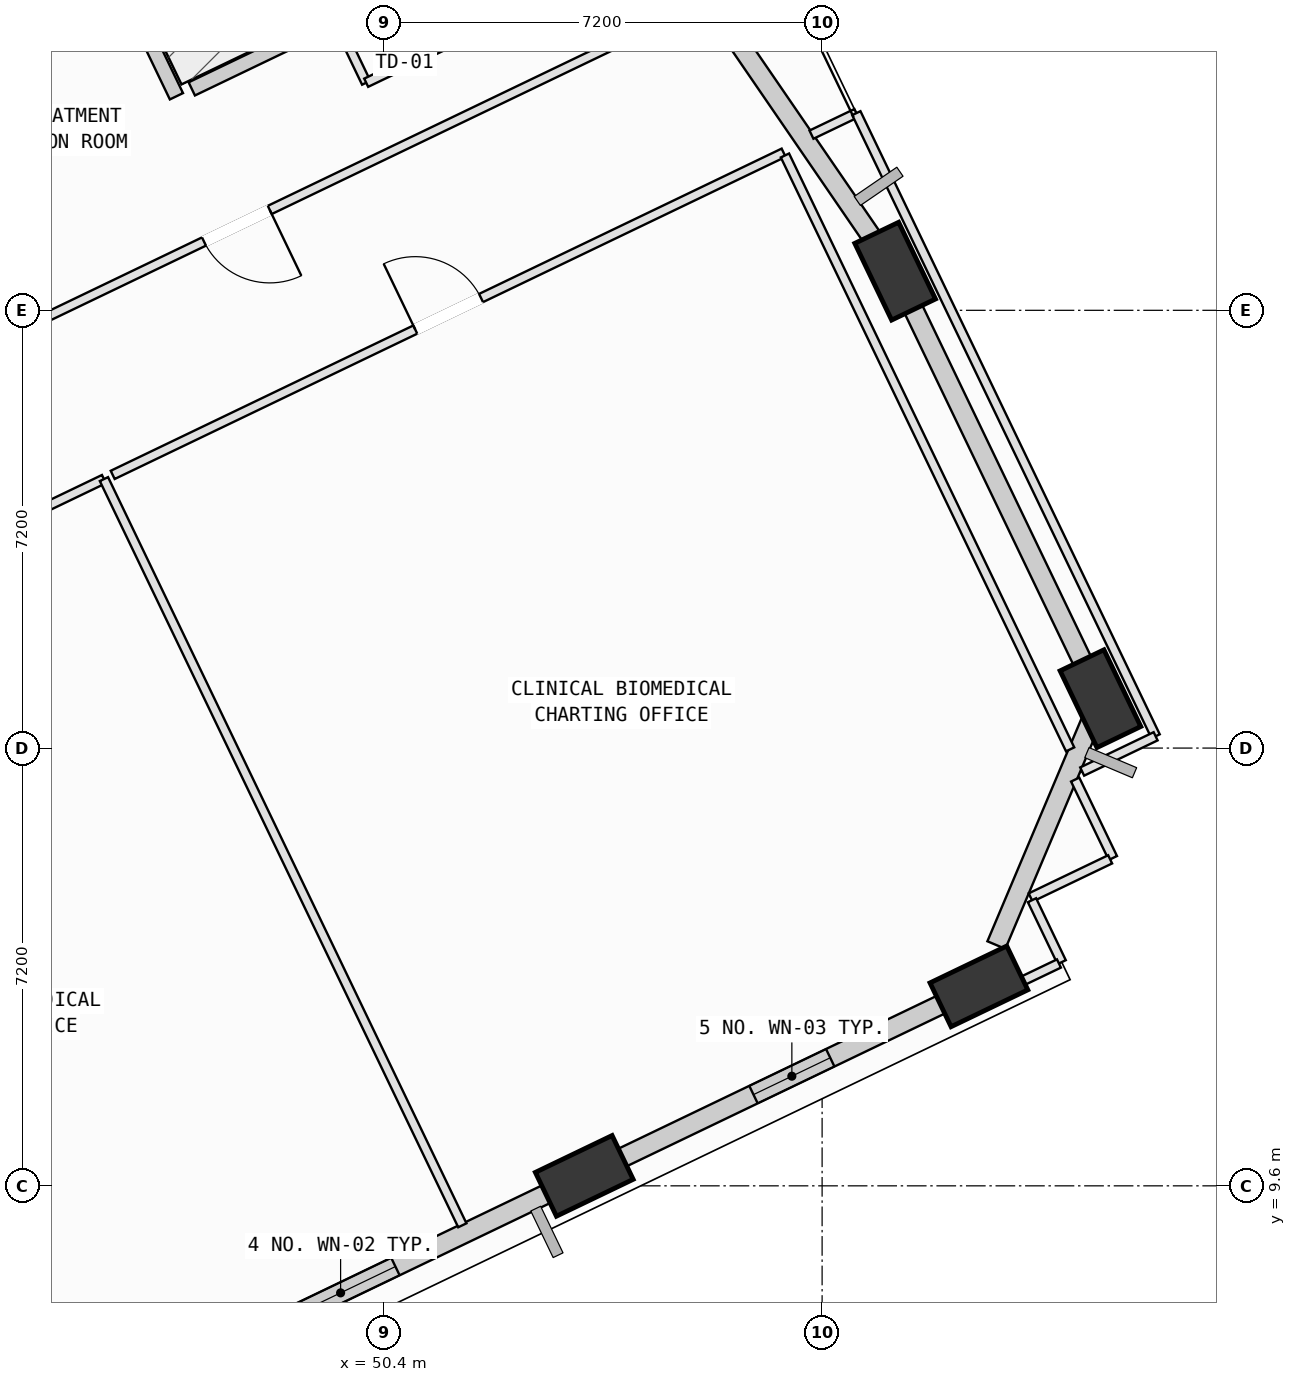
"""IFC4 building model, lengths in metres.
Left out: names, types, materials, properties, quantities, classifications, styles, units other than length and angle.
Written with IfcOpenShell. Run it as: python <this file> out.ifc"""

import sys

from ifc_helpers import new_model, si_unit, direction, frame, frame_2d, origin, origin_2d, place, context, subcontext, project, spatial, rectangle, extrude, element, fill, save


model = new_model("IFC4")
c1 = context("Model", 3, precision=1e-05, world=origin(), true_north=direction((0.0, 1.0)))
c2 = subcontext(c1, "Body", "Model", "MODEL_VIEW")
j1 = project(units=[si_unit("LENGTHUNIT", "METRE"), si_unit("PLANEANGLEUNIT", "RADIAN")], contexts=[c1])
p1 = place(None, origin())
s1 = spatial("IfcSite", under=j1, at=p1, CompositionType="ELEMENT")
p2 = place(p1, origin())
s2 = spatial("IfcBuilding", under=s1, at=p2, CompositionType="ELEMENT")
p3 = place(p2, frame((0.0, 0.0, 132.4)))
s3 = spatial("IfcBuildingStorey", under=s2, at=p3, CompositionType="ELEMENT", Elevation=132.4)
p4 = place(p3, frame((53.688, 9.764, 0.002), z_axis=(0.06131027357, 0.083306625435, 0.994636142775), x_axis=(-0.981231513844, 0.18756322246, 0.044774477334)))
e1 = element("IfcColumn", 1, at=p4, inside=s3, PredefinedType="COLUMN", context=c2, shape_type="SweptSolid", body=[
    extrude(rectangle(XDim=1.4, YDim=0.8, at=origin_2d()), origin(), (0.0, 0.0, 1.0), 4.018),
])
p5 = place(p3, frame((60.179, 12.881, 0.002), z_axis=(0.048096029974, 0.109777823773, 0.992791821737), x_axis=(-0.998144320493, -0.03187998618, 0.051880458253)))
e2 = element("IfcColumn", 2, at=p5, inside=s3, PredefinedType="COLUMN", context=c2, shape_type="SweptSolid", body=[
    extrude(rectangle(XDim=1.4, YDim=0.8, at=origin_2d()), origin(), (0.0, 0.0, 1.0), 4.025),
])
p6 = place(p3, frame((62.178, 17.612, 0.002), z_axis=(0.028561654516, 0.117824404935, 0.99262361522), x_axis=(0.209885345046, -0.971598652903, 0.109289521967)))
e3 = element("IfcColumn", 3, at=p6, inside=s3, PredefinedType="COLUMN", context=c2, shape_type="SweptSolid", body=[
    extrude(rectangle(XDim=1.4, YDim=0.8, at=origin_2d()), origin(), (0.0, 0.0, 1.0), 4.026),
])
p7 = place(p3, frame((58.801, 24.644, 0.002), z_axis=(-0.00024304177, 0.103900356523, 0.994587681829), x_axis=(0.434968645662, -0.89556113761, 0.093661764304)))
e4 = element("IfcColumn", 4, at=p7, inside=s3, PredefinedType="COLUMN", context=c2, shape_type="SweptSolid", body=[
    extrude(rectangle(XDim=1.4, YDim=0.8, at=origin_2d()), origin(), (0.0, 0.0, 1.0), 4.018),
])
p8 = place(p3, frame((47.233, 27.642, 0.0), z_axis=(0.0, 0.0, 1.0), x_axis=(0.901461742276, 0.432858784376, 0.0)))
e5 = element("IfcWall", 5, at=p8, inside=s3, PredefinedType="SOLIDWALL", context=c2, shape_type="SweptSolid", body=[
    extrude(rectangle(XDim=6.96, YDim=0.24, at=frame_2d((3.48, 0.0))), origin(), (0.0, 0.0, 1.0), 2.945),
])
p9 = place(p8, frame((2.93, 0.0, 0.0)))
e6 = element("IfcOpeningElement", 6, at=p9, cuts=e5, PredefinedType="OPENING", context=c2, shape_type="SweptSolid", body=[
    extrude(rectangle(XDim=1.1, YDim=2.15, at=frame_2d((0.55, 1.075))), frame((0.0, 0.13, 0.0), z_axis=(0.0, -1.0, 0.0), x_axis=(1.0, 0.0, 0.0)), (0.0, 0.0, 1.0), 0.26),
])
p10 = place(p3, frame((45.899, 29.774, 0.0), z_axis=(0.0, 0.0, 1.0), x_axis=(0.432937429984, -0.901423974453, 0.0)))
e7 = element("IfcWall", 7, at=p10, inside=s3, PredefinedType="SOLIDWALL", context=c2, shape_type="SweptSolid", body=[
    extrude(rectangle(XDim=2.5, YDim=0.24, at=frame_2d((1.25, 0.0))), origin(), (0.0, 0.0, 1.0), 3.165),
])
p11 = place(p3, frame((53.415, 9.633, 0.0), z_axis=(0.0, 0.0, 1.0), x_axis=(-0.901458716823, -0.43286508506, 0.0)))
e8 = element("IfcWall", 8, at=p11, inside=s3, PredefinedType="SOLIDWALL", context=c2, shape_type="SweptSolid", body=[
    extrude(rectangle(XDim=6.218, YDim=0.32, at=frame_2d((3.109, 0.0))), origin(), (0.0, 0.0, 1.0), 3.165),
])
p12 = place(p11, frame((3.142, 0.0, 0.75)))
e9 = element("IfcOpeningElement", 9, at=p12, cuts=e8, PredefinedType="OPENING", context=c2, shape_type="SweptSolid", body=[
    extrude(rectangle(XDim=2.0, YDim=1.95, at=frame_2d((1.0, 0.975))), frame((0.0, 0.17, 0.0), z_axis=(0.0, -1.0, 0.0), x_axis=(1.0, 0.0, 0.0)), (0.0, 0.0, 1.0), 0.34),
])
p13 = place(p3, frame((59.92, 12.756, 0.0), z_axis=(0.0, 0.0, 1.0), x_axis=(-0.901454692094, -0.432873466619, 0.0)))
e10 = element("IfcWall", 10, at=p13, inside=s3, PredefinedType="SOLIDWALL", context=c2, shape_type="SweptSolid", body=[
    extrude(rectangle(XDim=6.242, YDim=0.32, at=frame_2d((3.121, 0.0))), origin(), (0.0, 0.0, 1.0), 3.165),
])
p14 = place(p13, frame((2.425, 0.0, 0.75)))
e11 = element("IfcOpeningElement", 11, at=p14, cuts=e10, PredefinedType="OPENING", context=c2, shape_type="SweptSolid", body=[
    extrude(rectangle(XDim=1.4, YDim=1.85, at=frame_2d((0.7, 0.925))), frame((0.0, 0.17, 0.0), z_axis=(0.0, -1.0, 0.0), x_axis=(1.0, 0.0, 0.0)), (0.0, 0.0, 1.0), 0.34),
])
p15 = place(p3, frame((62.079, 17.379, 0.0), z_axis=(0.0, 0.0, 1.0), x_axis=(-0.38914420919, -0.921176847545, 0.0)))
e12 = element("IfcWall", 12, at=p15, inside=s3, PredefinedType="SOLIDWALL", context=c2, shape_type="SweptSolid", body=[
    extrude(rectangle(XDim=4.145, YDim=0.32, at=frame_2d((2.073, 0.0))), origin(), (0.0, 0.0, 1.0), 3.165),
])
p16 = place(p3, frame((58.931, 24.374, 0.0), z_axis=(0.0, 0.0, 1.0), x_axis=(0.432850582389, -0.901465680614, 0.0)))
e13 = element("IfcWall", 13, at=p16, inside=s3, PredefinedType="SOLIDWALL", context=c2, shape_type="SweptSolid", body=[
    extrude(rectangle(XDim=6.84, YDim=0.32, at=frame_2d((3.42, 0.0))), origin(), (0.0, 0.0, 1.0), 3.165),
])
p17 = place(p3, frame((53.433, 32.472, 0.0), z_axis=(0.0, 0.0, 1.0), x_axis=(0.565541240042, -0.824720016619, 0.0)))
e14 = element("IfcWall", 14, at=p17, inside=s3, PredefinedType="SOLIDWALL", context=c2, shape_type="SweptSolid", body=[
    extrude(rectangle(XDim=8.838, YDim=0.32, at=frame_2d((4.419, 0.0))), origin(), (0.0, 0.0, 1.0), 3.165),
])
p18 = place(p3, frame((41.489, 27.091, 0.0), z_axis=(0.0, 0.0, 1.0), x_axis=(0.901450827028, 0.432881515488, 0.0)))
e15 = element("IfcWall", 15, at=p18, inside=s3, PredefinedType="SOLIDWALL", context=c2, shape_type="SweptSolid", body=[
    extrude(rectangle(XDim=5.117, YDim=0.32, at=frame_2d((2.559, 0.0))), origin(), (0.0, 0.0, 1.0), 3.145),
])
p19 = place(p18, frame((1.635, 0.0, 0.75)))
e16 = element("IfcOpeningElement", 16, at=p19, cuts=e15, PredefinedType="OPENING", context=c2, shape_type="SweptSolid", body=[
    extrude(rectangle(XDim=2.0, YDim=1.95, at=frame_2d((1.0, 0.975))), frame((0.0, 0.17, 0.0), z_axis=(0.0, -1.0, 0.0), x_axis=(1.0, 0.0, 0.0)), (0.0, 0.0, 1.0), 0.34),
])
p20 = place(p3, frame((36.5, 16.763, 0.0), z_axis=(0.0, 0.0, 1.0), x_axis=(0.901430980475, 0.432922842363, 0.0)))
e17 = element("IfcWall", 17, at=p20, inside=s3, PredefinedType="PARTITIONING", context=c2, shape_type="SweptSolid", body=[
    extrude(rectangle(XDim=10.305, YDim=0.15, at=frame_2d((5.152, 0.0))), origin(), (0.0, 0.0, 1.0), 2.965),
])
p21 = place(p20, frame((4.552, 0.0, 0.0)))
e18 = element("IfcOpeningElement", 18, at=p21, cuts=e17, PredefinedType="OPENING", context=c2, shape_type="SweptSolid", body=[
    extrude(rectangle(XDim=1.2, YDim=2.15, at=frame_2d((0.6, 1.075))), frame((0.0, 0.085, 0.0), z_axis=(0.0, -1.0, 0.0), x_axis=(1.0, 0.0, 0.0)), (0.0, 0.0, 1.0), 0.17),
])
p22 = place(p3, frame((45.789, 21.224, 0.0), z_axis=(0.0, 0.0, 1.0), x_axis=(0.43290477925, -0.901439655275, 0.0)))
e19 = element("IfcWall", 19, at=p22, inside=s3, PredefinedType="PARTITIONING", context=c2, shape_type="SweptSolid", body=[
    extrude(rectangle(XDim=13.615, YDim=0.15, at=frame_2d((6.808, 0.0))), origin(), (0.0, 0.0, 1.0), 3.78),
])
p23 = place(p3, frame((45.933, 21.293, 0.0), z_axis=(0.0, 0.0, 1.0), x_axis=(0.901434334473, 0.432915858607, 0.0)))
e20 = element("IfcWall", 20, at=p23, inside=s3, PredefinedType="PARTITIONING", context=c2, shape_type="SweptSolid", body=[
    extrude(rectangle(XDim=12.24, YDim=0.15, at=frame_2d((6.12, 0.0))), origin(), (0.0, 0.0, 1.0), 3.78),
])
p24 = place(p23, frame((5.52, 0.0, 0.0)))
e21 = element("IfcOpeningElement", 21, at=p24, cuts=e20, PredefinedType="OPENING", context=c2, shape_type="SweptSolid", body=[
    extrude(rectangle(XDim=1.2, YDim=2.15, at=frame_2d((0.6, 1.075))), frame((0.0, 0.085, 0.0), z_axis=(0.0, -1.0, 0.0), x_axis=(1.0, 0.0, 0.0)), (0.0, 0.0, 1.0), 0.17),
])
p25 = place(p3, frame((56.989, 26.547, 0.0), z_axis=(0.0, 0.0, 1.0), x_axis=(0.432826288484, -0.901477345249, 0.0)))
e22 = element("IfcWall", 22, at=p25, inside=s3, PredefinedType="PARTITIONING", context=c2, shape_type="SweptSolid", body=[
    extrude(rectangle(XDim=10.836, YDim=0.15, at=frame_2d((5.418, 0.0))), origin(), (0.0, 0.0, 1.0), 3.78),
])
p26 = place(p3, frame((61.762, 16.282, 0.0), z_axis=(0.0, 0.0, 1.0), x_axis=(0.433241147815, -0.901278041361, 0.0)))
e23 = element("IfcWall", 23, at=p26, inside=s3, PredefinedType="PARTITIONING", context=c2, shape_type="SweptSolid", body=[
    extrude(rectangle(XDim=1.431, YDim=0.15, at=frame_2d((0.716, 0.0))), origin(), (0.0, 0.0, 1.0), 3.78),
])
p27 = place(p3, frame((62.337, 14.97, 0.0), z_axis=(0.0, 0.0, 1.0), x_axis=(-0.901617655836, -0.432533932409, 0.0)))
e24 = element("IfcWall", 24, at=p27, inside=s3, PredefinedType="PARTITIONING", context=c2, shape_type="SweptSolid", body=[
    extrude(rectangle(XDim=1.449, YDim=0.15, at=frame_2d((0.725, 0.0))), origin(), (0.0, 0.0, 1.0), 3.78),
])
p28 = place(p3, frame((61.052, 14.298, 0.0), z_axis=(0.0, 0.0, 1.0), x_axis=(0.431937120404, -0.901903722144, 0.0)))
e25 = element("IfcWall", 25, at=p28, inside=s3, PredefinedType="PARTITIONING", context=c2, shape_type="SweptSolid", body=[
    extrude(rectangle(XDim=1.13, YDim=0.15, at=frame_2d((0.565, 0.0))), origin(), (0.0, 0.0, 1.0), 3.78),
])
p29 = place(p3, frame((61.495, 13.257, 0.0), z_axis=(0.0, 0.0, 1.0), x_axis=(-0.901644033321, -0.4324789442, 0.0)))
e26 = element("IfcWall", 26, at=p29, inside=s3, PredefinedType="PARTITIONING", context=c2, shape_type="SweptSolid", body=[
    extrude(rectangle(XDim=1.637, YDim=0.15, at=frame_2d((0.819, 0.0))), origin(), (0.0, 0.0, 1.0), 3.78),
])
p30 = place(p3, frame((54.392, 9.847, 0.0), z_axis=(0.0, 0.0, 1.0), x_axis=(-0.901585698541, -0.432600541131, 0.0)))
e27 = element("IfcWall", 27, at=p30, inside=s3, PredefinedType="PARTITIONING", context=c2, shape_type="SweptSolid", body=[
    extrude(rectangle(XDim=0.973, YDim=0.15, at=frame_2d((0.486, 0.0))), origin(), (0.0, 0.0, 1.0), 3.165),
])
p31 = place(p3, frame((49.646, 28.694, 0.0), z_axis=(0.0, 0.0, 1.0), x_axis=(0.432339766945, -0.901710777311, 0.0)))
e28 = element("IfcWall", 28, at=p31, inside=s3, PredefinedType="PARTITIONING", context=c2, shape_type="SweptSolid", body=[
    extrude(rectangle(XDim=1.055, YDim=0.15, at=frame_2d((0.527, 0.0))), origin(), (0.0, 0.0, 1.0), 3.78),
])
p32 = place(p3, frame((50.102, 27.743, 0.0), z_axis=(0.0, 0.0, 1.0), x_axis=(0.901462559733, 0.432857081955, 0.0)))
e29 = element("IfcWall", 29, at=p32, inside=s3, PredefinedType="PARTITIONING", context=c2, shape_type="SweptSolid", body=[
    extrude(rectangle(XDim=1.7, YDim=0.15, at=frame_2d((0.85, 0.0))), origin(), (0.0, 0.0, 1.0), 3.78),
])
p33 = place(p3, frame((55.61, 29.058, 0.0), z_axis=(0.0, 0.0, 1.0), x_axis=(-0.901422279178, -0.432940959718, 0.0)))
e30 = element("IfcWall", 30, at=p33, inside=s3, PredefinedType="PARTITIONING", context=c2, shape_type="SweptSolid", body=[
    extrude(rectangle(XDim=16.94, YDim=0.15, at=frame_2d((8.47, 0.0))), origin(), (0.0, 0.0, 1.0), 2.945),
])
p34 = place(p33, frame((7.87, 0.0, 0.0)))
e31 = element("IfcOpeningElement", 31, at=p34, cuts=e30, PredefinedType="OPENING", context=c2, shape_type="SweptSolid", body=[
    extrude(rectangle(XDim=1.2, YDim=2.15, at=frame_2d((0.6, 1.075))), frame((0.0, 0.085, 0.0), z_axis=(0.0, -1.0, 0.0), x_axis=(1.0, 0.0, 0.0)), (0.0, 0.0, 1.0), 0.17),
])
p35 = place(p3, frame((57.425, 26.889, 0.0), z_axis=(0.0, 0.0, 1.0), x_axis=(0.901644033321, 0.4324789442, 0.0)))
e32 = element("IfcWall", 32, at=p35, inside=s3, PredefinedType="PARTITIONING", context=c2, shape_type="SweptSolid", body=[
    extrude(rectangle(XDim=0.819, YDim=0.15, at=frame_2d((0.409, 0.0))), origin(), (0.0, 0.0, 1.0), 3.78),
])
p36 = place(p3, frame((58.163, 27.243, 0.0), z_axis=(0.0, 0.0, 1.0), x_axis=(0.432898600904, -0.90144262232, 0.0)))
e33 = element("IfcWall", 33, at=p36, inside=s3, PredefinedType="PARTITIONING", context=c2, shape_type="SweptSolid", body=[
    extrude(rectangle(XDim=11.37, YDim=0.15, at=frame_2d((5.685, 0.0))), origin(), (0.0, 0.0, 1.0), 3.165),
])
p37 = place(p3, frame((63.085, 16.994, 0.0), z_axis=(0.0, 0.0, 1.0), x_axis=(-0.901525900623, -0.432725144296, 0.0)))
e34 = element("IfcWall", 34, at=p37, inside=s3, PredefinedType="PARTITIONING", context=c2, shape_type="SweptSolid", body=[
    extrude(rectangle(XDim=1.34, YDim=0.15, at=frame_2d((0.67, 0.0))), origin(), (0.0, 0.0, 1.0), 3.78),
])
p38 = place(p12, origin())
e35 = element("IfcWindow", 35, at=p38, inside=s3, PartitioningType="SINGLE_PANEL", PredefinedType="WINDOW", context=c2, shape_type="SweptSolid", body=[
    extrude(rectangle(XDim=2.0, YDim=1.95, at=frame_2d((1.0, 0.975))), frame((0.0, 0.03, 0.0), z_axis=(0.0, -1.0, 0.0), x_axis=(1.0, 0.0, 0.0)), (0.0, 0.0, 1.0), 0.06),
])
fill(e9, e35)
p39 = place(p14, origin())
e36 = element("IfcWindow", 36, at=p39, inside=s3, PartitioningType="SINGLE_PANEL", PredefinedType="WINDOW", context=c2, shape_type="SweptSolid", body=[
    extrude(rectangle(XDim=1.4, YDim=1.85, at=frame_2d((0.7, 0.925))), frame((0.0, 0.03, 0.0), z_axis=(0.0, -1.0, 0.0), x_axis=(1.0, 0.0, 0.0)), (0.0, 0.0, 1.0), 0.06),
])
fill(e11, e36)
p40 = place(p24, origin())
e37 = element("IfcDoor", 37, at=p40, inside=s3, OperationType="SINGLE_SWING_LEFT", PredefinedType="DOOR", context=c2, shape_type="SweptSolid", body=[
    extrude(rectangle(XDim=1.2, YDim=2.15, at=frame_2d((0.6, 1.075))), frame((0.0, 0.025, 0.0), z_axis=(0.0, -1.0, 0.0), x_axis=(1.0, 0.0, 0.0)), (0.0, 0.0, 1.0), 0.05),
])
fill(e21, e37)
p41 = place(p34, origin())
e38 = element("IfcDoor", 38, at=p41, inside=s3, OperationType="SINGLE_SWING_LEFT", PredefinedType="DOOR", context=c2, shape_type="SweptSolid", body=[
    extrude(rectangle(XDim=1.2, YDim=2.15, at=frame_2d((0.6, 1.075))), frame((0.0, 0.025, 0.0), z_axis=(0.0, -1.0, 0.0), x_axis=(1.0, 0.0, 0.0)), (0.0, 0.0, 1.0), 0.05),
])
fill(e31, e38)
save(model, sys.argv[1])
